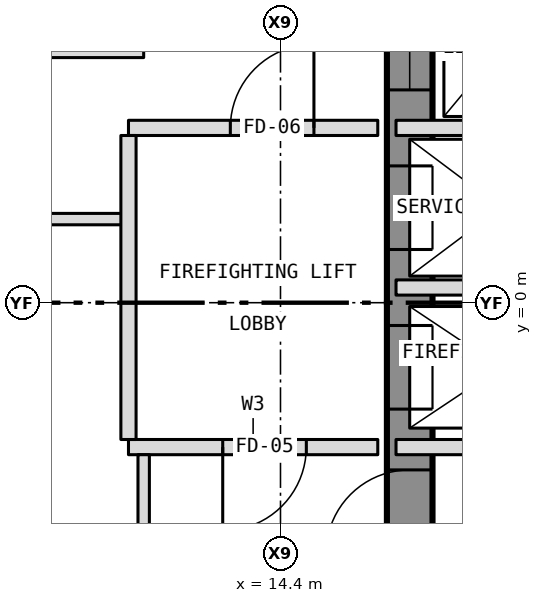
"""IFC4 building model, lengths in metres.
Left out: names, types, materials, properties, quantities, classifications, styles, units other than length and angle.
Written with IfcOpenShell. Run it as: python <this file> out.ifc"""

import sys

from ifc_helpers import new_model, si_unit, direction, frame, frame_2d, origin, place, context, subcontext, project, spatial, rectangle, extrude, element, fill, save


model = new_model("IFC4")
c1 = context("Model", 3, precision=1e-05, world=origin(), true_north=direction((0.0, 1.0)))
c2 = subcontext(c1, "Body", "Model", "MODEL_VIEW")
j1 = project(units=[si_unit("LENGTHUNIT", "METRE"), si_unit("PLANEANGLEUNIT", "RADIAN")], contexts=[c1])
p1 = place(None, origin())
s1 = spatial("IfcSite", under=j1, at=p1, CompositionType="ELEMENT")
p2 = place(p1, origin())
s2 = spatial("IfcBuilding", under=s1, at=p2, CompositionType="ELEMENT")
p3 = place(p2, frame((0.0, 0.0, 103.0)))
s3 = spatial("IfcBuildingStorey", under=s2, at=p3, CompositionType="ELEMENT", Elevation=103.0)
p4 = place(p3, frame((16.1, -10.8, 0.0), z_axis=(0.0, 0.0, 1.0), x_axis=(0.0, 1.0, 0.0)))
e1 = element("IfcWall", 1, at=p4, inside=s3, PredefinedType="SHEAR", context=c2, shape_type="SweptSolid", body=[
    extrude(rectangle(XDim=21.6, YDim=0.6, at=frame_2d((10.8, 0.0))), origin(), (0.0, 0.0, 1.0), 3.25),
])
p5 = place(p4, frame((9.4, 0.0, 0.0)))
e2 = element("IfcOpeningElement", 2, at=p5, cuts=e1, PredefinedType="OPENING", context=c2, shape_type="SweptSolid", body=[
    extrude(rectangle(XDim=1.1, YDim=2.1, at=frame_2d((0.55, 1.05))), frame((0.0, 0.312, 0.0), z_axis=(0.0, -1.0, 0.0), x_axis=(1.0, 0.0, 0.0)), (0.0, 0.0, 1.0), 0.624),
])
p6 = place(p4, frame((11.5, 0.0, 0.0)))
e3 = element("IfcOpeningElement", 3, at=p6, cuts=e1, PredefinedType="OPENING", context=c2, shape_type="SweptSolid", body=[
    extrude(rectangle(XDim=1.1, YDim=2.1, at=frame_2d((0.55, 1.05))), frame((0.0, 0.312, 0.0), z_axis=(0.0, -1.0, 0.0), x_axis=(1.0, 0.0, 0.0)), (0.0, 0.0, 1.0), 0.624),
])
p7 = place(p4, frame((13.6, 0.0, 0.0)))
e4 = element("IfcOpeningElement", 4, at=p7, cuts=e1, PredefinedType="OPENING", context=c2, shape_type="SweptSolid", body=[
    extrude(rectangle(XDim=1.1, YDim=2.1, at=frame_2d((0.55, 1.05))), frame((0.0, 0.312, 0.0), z_axis=(0.0, -1.0, 0.0), x_axis=(1.0, 0.0, 0.0)), (0.0, 0.0, 1.0), 0.624),
])
p8 = place(p4, frame((15.7, 0.0, 0.0)))
e5 = element("IfcOpeningElement", 5, at=p8, cuts=e1, PredefinedType="OPENING", context=c2, shape_type="SweptSolid", body=[
    extrude(rectangle(XDim=1.1, YDim=2.1, at=frame_2d((0.55, 1.05))), frame((0.0, 0.312, 0.0), z_axis=(0.0, -1.0, 0.0), x_axis=(1.0, 0.0, 0.0)), (0.0, 0.0, 1.0), 0.624),
])
p9 = place(p4, frame((17.8, 0.0, 0.0)))
e6 = element("IfcOpeningElement", 6, at=p9, cuts=e1, PredefinedType="OPENING", context=c2, shape_type="SweptSolid", body=[
    extrude(rectangle(XDim=1.1, YDim=2.1, at=frame_2d((0.55, 1.05))), frame((0.0, 0.312, 0.0), z_axis=(0.0, -1.0, 0.0), x_axis=(1.0, 0.0, 0.0)), (0.0, 0.0, 1.0), 0.624),
])
p10 = place(p4, frame((5.642, 0.0, 0.0)))
e7 = element("IfcOpeningElement", 7, at=p10, cuts=e1, PredefinedType="OPENING", context=c2, shape_type="SweptSolid", body=[
    extrude(rectangle(XDim=1.1, YDim=2.1, at=frame_2d((0.55, 1.05))), frame((0.0, 0.312, 0.0), z_axis=(0.0, -1.0, 0.0), x_axis=(1.0, 0.0, 0.0)), (0.0, 0.0, 1.0), 0.624),
])
p11 = place(p4, frame((7.5, 0.0, 0.0)))
e8 = element("IfcOpeningElement", 8, at=p11, cuts=e1, PredefinedType="OPENING", context=c2, shape_type="SweptSolid", body=[
    extrude(rectangle(XDim=1.1, YDim=2.1, at=frame_2d((0.55, 1.05))), frame((0.0, 0.312, 0.0), z_axis=(0.0, -1.0, 0.0), x_axis=(1.0, 0.0, 0.0)), (0.0, 0.0, 1.0), 0.624),
])
p12 = place(p3, frame((12.4, -1.9, 0.0), z_axis=(0.0, 0.0, 1.0), x_axis=(1.0, 0.0, 0.0)))
e9 = element("IfcWall", 9, at=p12, inside=s3, PredefinedType="PARTITIONING", context=c2, shape_type="SweptSolid", body=[
    extrude(rectangle(XDim=3.28, YDim=0.2, at=frame_2d((1.64, 0.0))), origin(), (0.0, 0.0, 1.0), 3.35),
])
p13 = place(p12, frame((1.24, 0.0, 0.0)))
e10 = element("IfcOpeningElement", 10, at=p13, cuts=e9, PredefinedType="OPENING", context=c2, shape_type="SweptSolid", body=[
    extrude(rectangle(XDim=1.1, YDim=2.1, at=frame_2d((0.55, 1.05))), frame((0.0, 0.112, 0.0), z_axis=(0.0, -1.0, 0.0), x_axis=(1.0, 0.0, 0.0)), (0.0, 0.0, 1.0), 0.224),
])
p14 = place(p3, frame((15.92, -1.9, 0.0), z_axis=(0.0, 0.0, 1.0), x_axis=(1.0, 0.0, 0.0)))
e11 = element("IfcWall", 11, at=p14, inside=s3, PredefinedType="PARTITIONING", context=c2, shape_type="SweptSolid", body=[
    extrude(rectangle(XDim=6.76, YDim=0.2, at=frame_2d((3.38, 0.0))), origin(), (0.0, 0.0, 1.0), 3.25),
])
p15 = place(p14, frame((3.74, 0.0, 0.0)))
e12 = element("IfcOpeningElement", 12, at=p15, cuts=e11, PredefinedType="OPENING", context=c2, shape_type="SweptSolid", body=[
    extrude(rectangle(XDim=0.9, YDim=2.1, at=frame_2d((0.45, 1.05))), frame((0.0, 0.112, 0.0), z_axis=(0.0, -1.0, 0.0), x_axis=(1.0, 0.0, 0.0)), (0.0, 0.0, 1.0), 0.224),
])
p16 = place(p3, frame((15.92, 0.2, 0.0), z_axis=(0.0, 0.0, 1.0), x_axis=(1.0, 0.0, 0.0)))
e13 = element("IfcWall", 13, at=p16, inside=s3, PredefinedType="PARTITIONING", context=c2, shape_type="SweptSolid", body=[
    extrude(rectangle(XDim=2.88, YDim=0.2, at=frame_2d((1.44, 0.0))), origin(), (0.0, 0.0, 1.0), 3.25),
])
p17 = place(p3, frame((-12.4, 1.1, 0.0), z_axis=(0.0, 0.0, 1.0), x_axis=(1.0, 0.0, 0.0)))
e14 = element("IfcWall", 14, at=p17, inside=s3, PredefinedType="PARTITIONING", context=c2, shape_type="SweptSolid", body=[
    extrude(rectangle(XDim=24.8, YDim=0.15, at=frame_2d((12.4, 0.0))), origin(), (0.0, 0.0, 1.0), 3.35),
])
p18 = place(p3, frame((12.4, 2.3, 0.0), z_axis=(0.0, 0.0, 1.0), x_axis=(1.0, 0.0, 0.0)))
e15 = element("IfcWall", 15, at=p18, inside=s3, PredefinedType="PARTITIONING", context=c2, shape_type="SweptSolid", body=[
    extrude(rectangle(XDim=3.28, YDim=0.2, at=frame_2d((1.64, 0.0))), origin(), (0.0, 0.0, 1.0), 3.35),
])
p19 = place(p18, frame((1.34, 0.0, 0.0)))
e16 = element("IfcOpeningElement", 16, at=p19, cuts=e15, PredefinedType="OPENING", context=c2, shape_type="SweptSolid", body=[
    extrude(rectangle(XDim=1.1, YDim=2.1, at=frame_2d((0.55, 1.05))), frame((0.0, 0.112, 0.0), z_axis=(0.0, -1.0, 0.0), x_axis=(1.0, 0.0, 0.0)), (0.0, 0.0, 1.0), 0.224),
])
p20 = place(p3, frame((15.92, 2.3, 0.0), z_axis=(0.0, 0.0, 1.0), x_axis=(1.0, 0.0, 0.0)))
e17 = element("IfcWall", 17, at=p20, inside=s3, PredefinedType="PARTITIONING", context=c2, shape_type="SweptSolid", body=[
    extrude(rectangle(XDim=2.88, YDim=0.2, at=frame_2d((1.44, 0.0))), origin(), (0.0, 0.0, 1.0), 3.25),
])
p21 = place(p3, frame((-12.6, 3.3, 0.0), z_axis=(0.0, 0.0, 1.0), x_axis=(1.0, 0.0, 0.0)))
e18 = element("IfcWall", 18, at=p21, inside=s3, PredefinedType="PARTITIONING", context=c2, shape_type="SweptSolid", body=[
    extrude(rectangle(XDim=25.2, YDim=0.15, at=frame_2d((12.6, 0.0))), origin(), (0.0, 0.0, 1.0), 3.35),
])
p22 = place(p3, frame((12.4, -1.8, 0.0), z_axis=(0.0, 0.0, 1.0), x_axis=(0.0, 1.0, 0.0)))
e19 = element("IfcWall", 19, at=p22, inside=s3, PredefinedType="PARTITIONING", context=c2, shape_type="SweptSolid", body=[
    extrude(rectangle(XDim=4.0, YDim=0.2, at=frame_2d((2.0, 0.0))), origin(), (0.0, 0.0, 1.0), 3.35),
])
p23 = place(p3, frame((12.6, -12.525, 0.0), z_axis=(0.0, 0.0, 1.0), x_axis=(0.0, 1.0, 0.0)))
e20 = element("IfcWall", 20, at=p23, inside=s3, PredefinedType="PARTITIONING", context=c2, shape_type="SweptSolid", body=[
    extrude(rectangle(XDim=10.525, YDim=0.15, at=frame_2d((5.262, 0.0))), origin(), (0.0, 0.0, 1.0), 3.35),
])
p24 = place(p5, origin())
e21 = element("IfcDoor", 21, at=p24, inside=s3, OperationType="SLIDING_TO_LEFT", PredefinedType="DOOR", context=c2, shape_type="SweptSolid", body=[
    extrude(rectangle(XDim=1.1, YDim=2.1, at=frame_2d((0.55, 1.05))), frame((0.0, 0.025, 0.0), z_axis=(0.0, -1.0, 0.0), x_axis=(1.0, 0.0, 0.0)), (0.0, 0.0, 1.0), 0.05),
])
fill(e2, e21)
p25 = place(p6, origin())
e22 = element("IfcDoor", 22, at=p25, inside=s3, OperationType="SLIDING_TO_LEFT", PredefinedType="DOOR", context=c2, shape_type="SweptSolid", body=[
    extrude(rectangle(XDim=1.1, YDim=2.1, at=frame_2d((0.55, 1.05))), frame((0.0, 0.025, 0.0), z_axis=(0.0, -1.0, 0.0), x_axis=(1.0, 0.0, 0.0)), (0.0, 0.0, 1.0), 0.05),
])
fill(e3, e22)
p26 = place(p7, origin())
e23 = element("IfcDoor", 23, at=p26, inside=s3, OperationType="SLIDING_TO_LEFT", PredefinedType="DOOR", context=c2, shape_type="SweptSolid", body=[
    extrude(rectangle(XDim=1.1, YDim=2.1, at=frame_2d((0.55, 1.05))), frame((0.0, 0.025, 0.0), z_axis=(0.0, -1.0, 0.0), x_axis=(1.0, 0.0, 0.0)), (0.0, 0.0, 1.0), 0.05),
])
fill(e4, e23)
p27 = place(p11, origin())
e24 = element("IfcDoor", 24, at=p27, inside=s3, OperationType="SINGLE_SWING_LEFT", PredefinedType="DOOR", context=c2, shape_type="SweptSolid", body=[
    extrude(rectangle(XDim=1.1, YDim=2.1, at=frame_2d((0.55, 1.05))), frame((0.0, 0.025, 0.0), z_axis=(0.0, -1.0, 0.0), x_axis=(1.0, 0.0, 0.0)), (0.0, 0.0, 1.0), 0.05),
])
fill(e8, e24)
p28 = place(p13, origin())
e25 = element("IfcDoor", 25, at=p28, inside=s3, OperationType="SINGLE_SWING_LEFT", PredefinedType="DOOR", context=c2, shape_type="SweptSolid", body=[
    extrude(rectangle(XDim=1.1, YDim=2.1, at=frame_2d((0.55, 1.05))), frame((0.0, 0.025, 0.0), z_axis=(0.0, -1.0, 0.0), x_axis=(1.0, 0.0, 0.0)), (0.0, 0.0, 1.0), 0.05),
])
fill(e10, e25)
p29 = place(p19, origin())
e26 = element("IfcDoor", 26, at=p29, inside=s3, OperationType="SINGLE_SWING_RIGHT", PredefinedType="DOOR", context=c2, shape_type="SweptSolid", body=[
    extrude(rectangle(XDim=1.1, YDim=2.1, at=frame_2d((0.55, 1.05))), frame((0.0, 0.025, 0.0), z_axis=(0.0, -1.0, 0.0), x_axis=(1.0, 0.0, 0.0)), (0.0, 0.0, 1.0), 0.05),
])
fill(e16, e26)
save(model, sys.argv[1])
